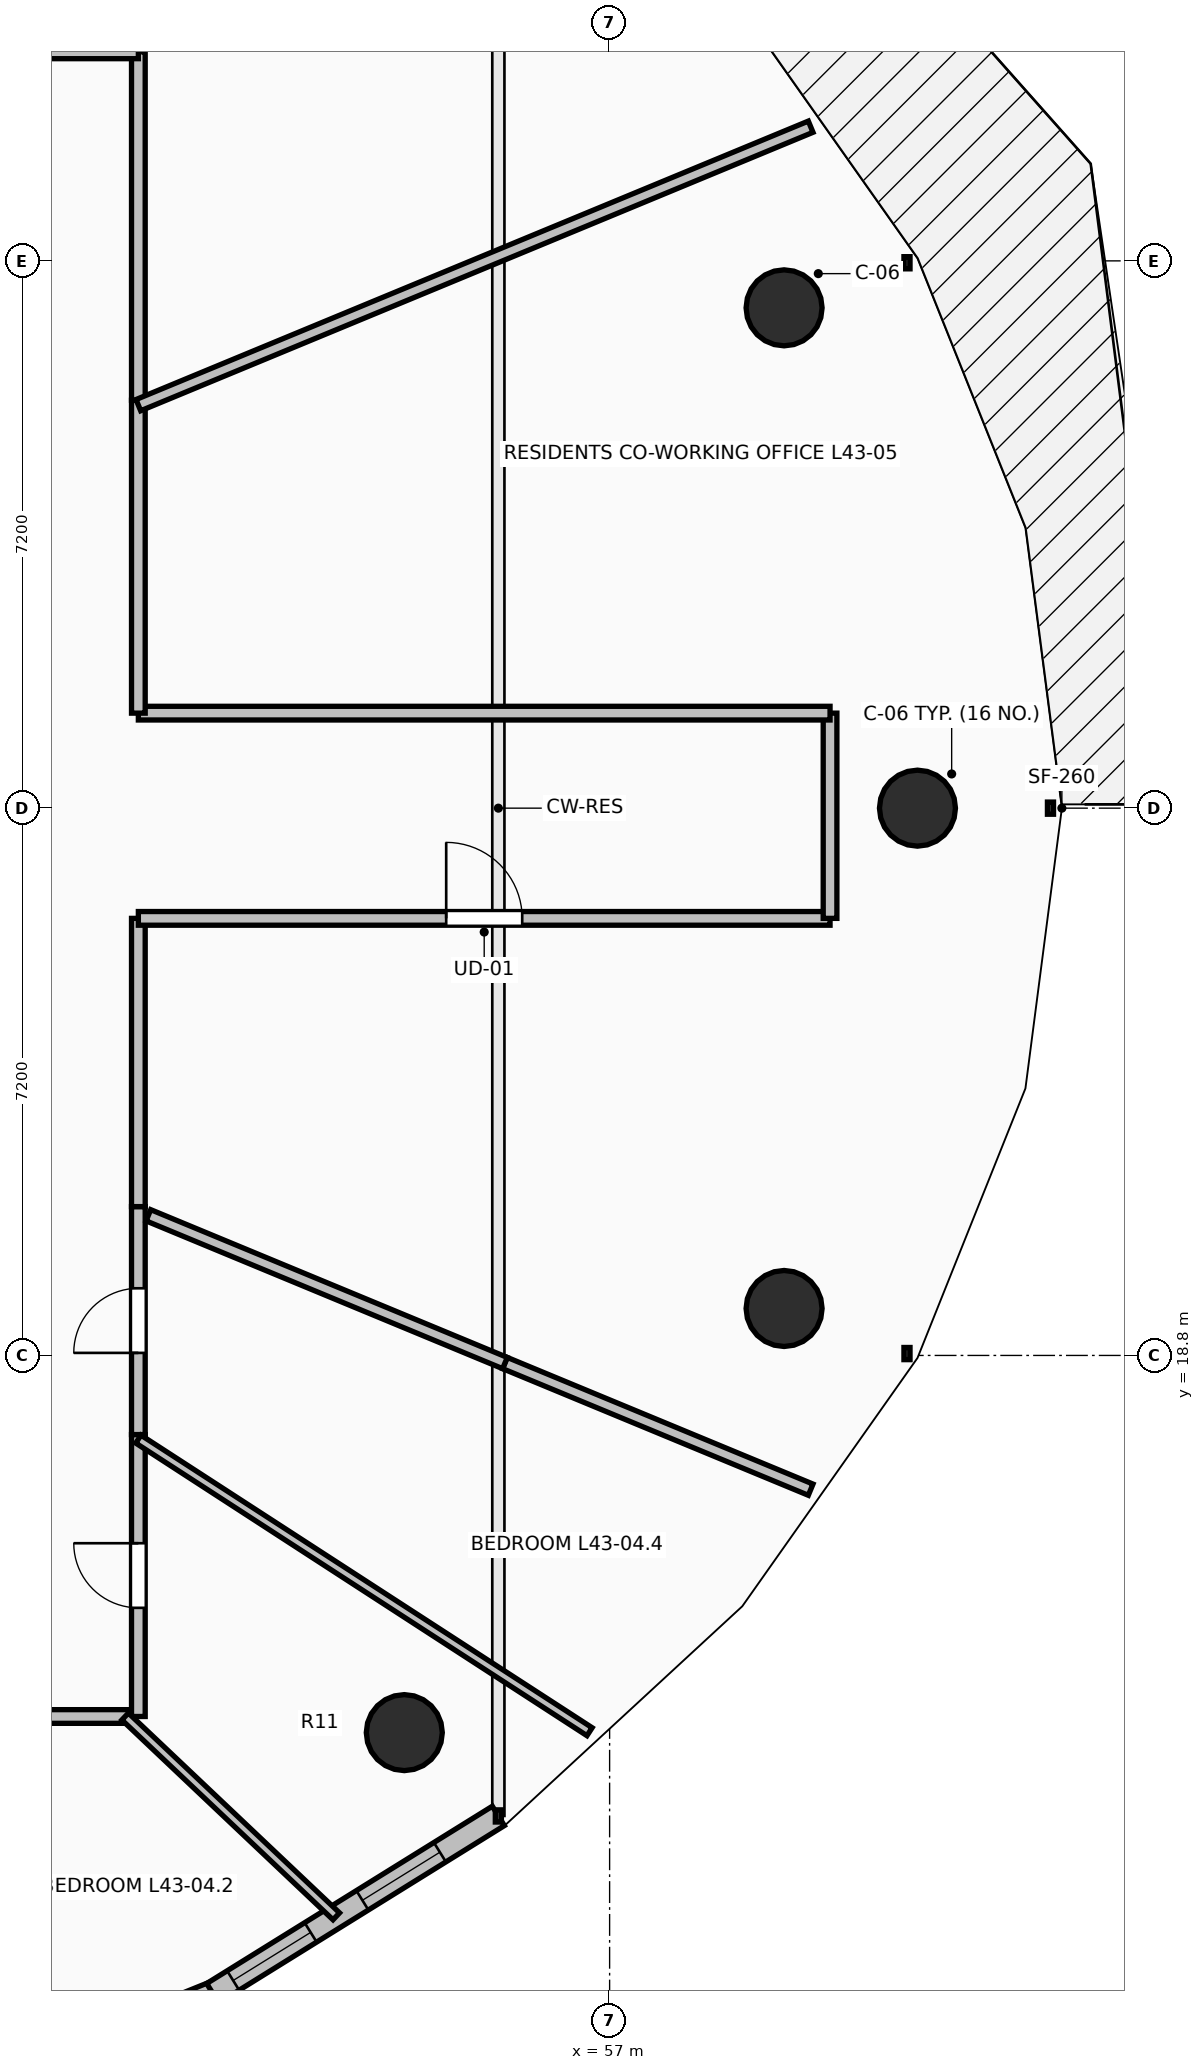
"""IFC4 building model, lengths in metres.
Left out: names, types, materials, properties, quantities, classifications, styles, units other than length and angle.
Written with IfcOpenShell. Run it as: python <this file> out.ifc"""

import sys

from ifc_helpers import new_model, si_unit, direction, frame, frame_2d, origin, origin_2d, place, context, subcontext, project, spatial, rectangle, circle, extrude, element, fill, save


model = new_model("IFC4")
c1 = context("Model", 3, precision=1e-05, world=origin(), true_north=direction((0.0, 1.0)))
c2 = subcontext(c1, "Body", "Model", "MODEL_VIEW")
j1 = project(units=[si_unit("LENGTHUNIT", "METRE"), si_unit("PLANEANGLEUNIT", "RADIAN")], contexts=[c1])
p1 = place(None, origin())
s1 = spatial("IfcSite", under=j1, at=p1, CompositionType="ELEMENT")
p2 = place(p1, origin())
s2 = spatial("IfcBuilding", under=s1, at=p2, CompositionType="ELEMENT")
p3 = place(p2, frame((0.0, 0.0, 160.6)))
s3 = spatial("IfcBuildingStorey", under=s2, at=p3, CompositionType="ELEMENT", Elevation=160.6)
for number, where, z_axis, x_axis in (
    (1, (61.05, 26.0, 0.0), (0.0, 0.0, 1.0), (1.0, 0.0, 0.0)),
    (2, (59.295, 32.582, 0.0), (0.0, 0.0, 1.0), (0.924, 0.383, 0.0)),
    (3, (54.299, 13.838, 0.0), (0.0, 0.0, 1.0), (0.707, -0.707, 0.0)),
    (4, (59.295, 19.418, 0.0), (0.0, 0.0, 1.0), (0.924, -0.383, 0.0)),
):
    element("IfcColumn", number, at=place(p3, frame(where, z_axis=z_axis, x_axis=x_axis)), inside=s3, PredefinedType="COLUMN", context=c2, shape_type="SweptSolid", body=[
        extrude(circle(Radius=0.5, at=origin_2d()), origin(), (0.0, 0.0, 1.0), 3.5),
    ])
p4 = place(p3, frame((47.49, 8.677, 0.0), z_axis=(0.0, 0.0, 1.0), x_axis=(0.927156504392, 0.374674280359, 0.0)))
e5 = element("IfcWall", 5, at=p4, inside=s3, PredefinedType="STANDARD", context=c2, shape_type="SweptSolid", body=[
    extrude(rectangle(XDim=4.625, YDim=0.3, at=frame_2d((2.312, 0.0))), origin(), (0.0, 0.0, 1.0), 3.24),
])
p5 = place(p4, frame((1.03, 0.0, 0.85)))
e6 = element("IfcOpeningElement", 6, at=p5, cuts=e5, PredefinedType="OPENING", context=c2, shape_type="SweptSolid", body=[
    extrude(rectangle(XDim=1.2, YDim=1.95, at=frame_2d((0.6, 0.975))), frame((0.0, 0.165, 0.0), z_axis=(0.0, -1.0, 0.0), x_axis=(1.0, 0.0, 0.0)), (0.0, 0.0, 1.0), 0.33),
])
p6 = place(p3, frame((51.778, 10.41, 0.0), z_axis=(0.0, 0.0, 1.0), x_axis=(0.849721181976, 0.527232313977, 0.0)))
e7 = element("IfcWall", 7, at=p6, inside=s3, PredefinedType="STANDARD", context=c2, shape_type="SweptSolid", body=[
    extrude(rectangle(XDim=4.423, YDim=0.3, at=frame_2d((2.211, 0.0))), origin(), (0.0, 0.0, 1.0), 3.24),
])
p7 = place(p6, frame((0.317, 0.0, 0.85)))
e8 = element("IfcOpeningElement", 8, at=p7, cuts=e7, PredefinedType="OPENING", context=c2, shape_type="SweptSolid", body=[
    extrude(rectangle(XDim=1.2, YDim=1.95, at=frame_2d((0.6, 0.975))), frame((0.0, 0.165, 0.0), z_axis=(0.0, -1.0, 0.0), x_axis=(1.0, 0.0, 0.0)), (0.0, 0.0, 1.0), 0.33),
])
p8 = place(p6, frame((2.318, 0.0, 0.85)))
e9 = element("IfcOpeningElement", 9, at=p8, cuts=e7, PredefinedType="OPENING", context=c2, shape_type="SweptSolid", body=[
    extrude(rectangle(XDim=1.2, YDim=1.95, at=frame_2d((0.6, 0.975))), frame((0.0, 0.165, 0.0), z_axis=(0.0, -1.0, 0.0), x_axis=(1.0, 0.0, 0.0)), (0.0, 0.0, 1.0), 0.33),
])
p9 = place(p3, frame((46.792, 14.05, 0.0), z_axis=(0.0, 0.0, 1.0), x_axis=(1.0, 0.0, 0.0)))
e10 = element("IfcWall", 10, at=p9, inside=s3, PredefinedType="PARTITIONING", context=c2, shape_type="SweptSolid", body=[
    extrude(rectangle(XDim=3.921, YDim=0.18, at=frame_2d((1.96, 0.0))), origin(), (0.0, 0.0, 1.0), 2.432),
])
p10 = place(p9, frame((1.535, 0.0, 0.0)))
e11 = element("IfcOpeningElement", 11, at=p10, cuts=e10, PredefinedType="OPENING", context=c2, shape_type="SweptSolid", body=[
    extrude(rectangle(XDim=0.85, YDim=2.1, at=frame_2d((0.425, 1.05))), frame((0.0, 0.105, 0.0), z_axis=(0.0, -1.0, 0.0), x_axis=(1.0, 0.0, 0.0)), (0.0, 0.0, 1.0), 0.21),
])
p11 = place(p3, frame((50.8, 14.05, 0.0), z_axis=(0.0, 0.0, 1.0), x_axis=(0.0, 1.0, 0.0)))
e12 = element("IfcWall", 12, at=p11, inside=s3, PredefinedType="PARTITIONING", context=c2, shape_type="SweptSolid", body=[
    extrude(rectangle(XDim=3.709, YDim=0.18, at=frame_2d((1.854, 0.0))), origin(), (0.0, 0.0, 1.0), 2.432),
])
p12 = place(p11, frame((1.429, 0.0, 0.0)))
e13 = element("IfcOpeningElement", 13, at=p12, cuts=e12, PredefinedType="OPENING", context=c2, shape_type="SweptSolid", body=[
    extrude(rectangle(XDim=0.85, YDim=2.1, at=frame_2d((0.425, 1.05))), frame((0.0, 0.105, 0.0), z_axis=(0.0, -1.0, 0.0), x_axis=(1.0, 0.0, 0.0)), (0.0, 0.0, 1.0), 0.21),
])
p13 = place(p3, frame((50.8, 17.759, 0.0), z_axis=(0.0, 0.0, 1.0), x_axis=(0.0, 1.0, 0.0)))
e14 = element("IfcWall", 14, at=p13, inside=s3, PredefinedType="PARTITIONING", context=c2, shape_type="SweptSolid", body=[
    extrude(rectangle(XDim=2.999, YDim=0.18, at=frame_2d((1.5, 0.0))), origin(), (0.0, 0.0, 1.0), 3.24),
])
p14 = place(p13, frame((1.074, 0.0, 0.0)))
e15 = element("IfcOpeningElement", 15, at=p14, cuts=e14, PredefinedType="OPENING", context=c2, shape_type="SweptSolid", body=[
    extrude(rectangle(XDim=0.85, YDim=2.1, at=frame_2d((0.425, 1.05))), frame((0.0, 0.105, 0.0), z_axis=(0.0, -1.0, 0.0), x_axis=(1.0, 0.0, 0.0)), (0.0, 0.0, 1.0), 0.21),
])
p15 = place(p3, frame((50.8, 20.758, 0.0), z_axis=(0.0, 0.0, 1.0), x_axis=(0.0, 1.0, 0.0)))
e16 = element("IfcWall", 16, at=p15, inside=s3, PredefinedType="PARTITIONING", context=c2, shape_type="SweptSolid", body=[
    extrude(rectangle(XDim=3.792, YDim=0.18, at=frame_2d((1.896, 0.0))), origin(), (0.0, 0.0, 1.0), 3.24),
])
p16 = place(p3, frame((50.8, 24.55, 0.0), z_axis=(0.0, 0.0, 1.0), x_axis=(1.0, 0.0, 0.0)))
e17 = element("IfcWall", 17, at=p16, inside=s3, PredefinedType="PARTITIONING", context=c2, shape_type="SweptSolid", body=[
    extrude(rectangle(XDim=9.1, YDim=0.18, at=frame_2d((4.55, 0.0))), origin(), (0.0, 0.0, 1.0), 2.432),
])
p17 = place(p16, frame((4.05, 0.0, 0.0)))
e18 = element("IfcOpeningElement", 18, at=p17, cuts=e17, PredefinedType="OPENING", context=c2, shape_type="SweptSolid", body=[
    extrude(rectangle(XDim=1.0, YDim=2.15, at=frame_2d((0.5, 1.075))), frame((0.0, 0.105, 0.0), z_axis=(0.0, -1.0, 0.0), x_axis=(1.0, 0.0, 0.0)), (0.0, 0.0, 1.0), 0.21),
])
p18 = place(p3, frame((59.9, 24.55, 0.0), z_axis=(0.0, 0.0, 1.0), x_axis=(0.0, 1.0, 0.0)))
e19 = element("IfcWall", 19, at=p18, inside=s3, PredefinedType="PARTITIONING", context=c2, shape_type="SweptSolid", body=[
    extrude(rectangle(XDim=2.7, YDim=0.18, at=frame_2d((1.35, 0.0))), origin(), (0.0, 0.0, 1.0), 2.432),
])
p19 = place(p3, frame((59.9, 27.25, 0.0), z_axis=(0.0, 0.0, 1.0), x_axis=(-1.0, 0.0, 0.0)))
e20 = element("IfcWall", 20, at=p19, inside=s3, PredefinedType="PARTITIONING", context=c2, shape_type="SweptSolid", body=[
    extrude(rectangle(XDim=9.1, YDim=0.18, at=frame_2d((4.55, 0.0))), origin(), (0.0, 0.0, 1.0), 2.432),
])
p20 = place(p3, frame((50.8, 27.25, 0.0), z_axis=(0.0, 0.0, 1.0), x_axis=(0.0, 1.0, 0.0)))
e21 = element("IfcWall", 21, at=p20, inside=s3, PredefinedType="PARTITIONING", context=c2, shape_type="SweptSolid", body=[
    extrude(rectangle(XDim=4.117, YDim=0.18, at=frame_2d((2.059, 0.0))), origin(), (0.0, 0.0, 1.0), 2.432),
])
p21 = place(p3, frame((50.8, 31.367, 0.0), z_axis=(0.0, 0.0, 1.0), x_axis=(0.0, 1.0, 0.0)))
e22 = element("IfcWall", 22, at=p21, inside=s3, PredefinedType="PARTITIONING", context=c2, shape_type="SweptSolid", body=[
    extrude(rectangle(XDim=4.583, YDim=0.18, at=frame_2d((2.292, 0.0))), origin(), (0.0, 0.0, 1.0), 2.432),
])
p22 = place(p3, frame((50.8, 35.95, 0.0), z_axis=(0.0, 0.0, 1.0), x_axis=(-1.0, 0.0, 0.0)))
e23 = element("IfcWall", 23, at=p22, inside=s3, PredefinedType="PARTITIONING", context=c2, shape_type="SweptSolid", body=[
    extrude(rectangle(XDim=8.474, YDim=0.18, at=frame_2d((4.237, 0.0))), origin(), (0.0, 0.0, 1.0), 2.432),
])
p23 = place(p22, frame((3.737, 0.0, 0.0)))
e24 = element("IfcOpeningElement", 24, at=p23, cuts=e23, PredefinedType="OPENING", context=c2, shape_type="SweptSolid", body=[
    extrude(rectangle(XDim=1.0, YDim=2.15, at=frame_2d((0.5, 1.075))), frame((0.0, 0.105, 0.0), z_axis=(0.0, -1.0, 0.0), x_axis=(1.0, 0.0, 0.0)), (0.0, 0.0, 1.0), 0.21),
])
p24 = place(p3, frame((49.92, 9.661, 0.0), z_axis=(0.0, 0.0, 1.0), x_axis=(-0.589349395673, 0.807878264233, 0.0)))
e25 = element("IfcWall", 25, at=p24, inside=s3, PredefinedType="PARTITIONING", context=c2, shape_type="SweptSolid", body=[
    extrude(rectangle(XDim=5.433, YDim=0.125, at=frame_2d((2.716, 0.0))), origin(), (0.0, 0.0, 1.0), 2.432),
])
p25 = place(p3, frame((53.404, 11.421, 0.0), z_axis=(0.0, 0.0, 1.0), x_axis=(-0.726306487509, 0.687370996044, 0.0)))
e26 = element("IfcWall", 26, at=p25, inside=s3, PredefinedType="PARTITIONING", context=c2, shape_type="SweptSolid", body=[
    extrude(rectangle(XDim=3.825, YDim=0.125, at=frame_2d((1.913, 0.0))), origin(), (0.0, 0.0, 1.0), 2.728),
])
p26 = place(p3, frame((56.736, 13.85, 0.0), z_axis=(0.0, 0.0, 1.0), x_axis=(-0.839059638195, 0.544039450364, 0.0)))
e27 = element("IfcWall", 27, at=p26, inside=s3, PredefinedType="PARTITIONING", context=c2, shape_type="SweptSolid", body=[
    extrude(rectangle(XDim=7.075, YDim=0.125, at=frame_2d((3.537, 0.0))), origin(), (0.0, 0.0, 1.0), 2.728),
])
p27 = place(p3, frame((59.645, 17.034, 0.0), z_axis=(0.0, 0.0, 1.0), x_axis=(-0.923874659351, 0.382695197002, 0.0)))
e28 = element("IfcWall", 28, at=p27, inside=s3, PredefinedType="PARTITIONING", context=c2, shape_type="SweptSolid", body=[
    extrude(rectangle(XDim=4.353, YDim=0.16, at=frame_2d((2.177, 0.0))), origin(), (0.0, 0.0, 1.0), 2.728),
])
p28 = place(p3, frame((55.623, 18.7, 0.0), z_axis=(0.0, 0.0, 1.0), x_axis=(-0.923813457571, 0.382842912446, 0.0)))
e29 = element("IfcWall", 29, at=p28, inside=s3, PredefinedType="PARTITIONING", context=c2, shape_type="SweptSolid", body=[
    extrude(rectangle(XDim=5.078, YDim=0.16, at=frame_2d((2.539, 0.0))), origin(), (0.0, 0.0, 1.0), 2.886),
])
p29 = place(p3, frame((59.645, 34.965, 0.0), z_axis=(0.0, 0.0, 1.0), x_axis=(-0.923902460479, -0.382628074665, 0.0)))
e30 = element("IfcWall", 30, at=p29, inside=s3, PredefinedType="PARTITIONING", context=c2, shape_type="SweptSolid", body=[
    extrude(rectangle(XDim=9.573, YDim=0.16, at=frame_2d((4.787, 0.0))), origin(), (0.0, 0.0, 1.0), 2.432),
])
p30 = place(p7, origin())
e31 = element("IfcWindow", 31, at=p30, inside=s3, PartitioningType="SINGLE_PANEL", PredefinedType="WINDOW", context=c2, shape_type="SweptSolid", body=[
    extrude(rectangle(XDim=1.2, YDim=1.95, at=frame_2d((0.6, 0.975))), frame((0.0, 0.03, 0.0), z_axis=(0.0, -1.0, 0.0), x_axis=(1.0, 0.0, 0.0)), (0.0, 0.0, 1.0), 0.06),
])
fill(e8, e31)
p31 = place(p8, origin())
e32 = element("IfcWindow", 32, at=p31, inside=s3, PartitioningType="SINGLE_PANEL", PredefinedType="WINDOW", context=c2, shape_type="SweptSolid", body=[
    extrude(rectangle(XDim=1.2, YDim=1.95, at=frame_2d((0.6, 0.975))), frame((0.0, 0.03, 0.0), z_axis=(0.0, -1.0, 0.0), x_axis=(1.0, 0.0, 0.0)), (0.0, 0.0, 1.0), 0.06),
])
fill(e9, e32)
p32 = place(p17, origin())
e33 = element("IfcDoor", 33, at=p32, inside=s3, OperationType="SINGLE_SWING_LEFT", PredefinedType="DOOR", context=c2, shape_type="SweptSolid", body=[
    extrude(rectangle(XDim=1.0, YDim=2.15, at=frame_2d((0.5, 1.075))), frame((0.0, 0.025, 0.0), z_axis=(0.0, -1.0, 0.0), x_axis=(1.0, 0.0, 0.0)), (0.0, 0.0, 1.0), 0.05),
])
fill(e18, e33)
p33 = place(p12, origin())
e34 = element("IfcDoor", 34, at=p33, inside=s3, OperationType="SINGLE_SWING_RIGHT", PredefinedType="DOOR", context=c2, shape_type="SweptSolid", body=[
    extrude(rectangle(XDim=0.85, YDim=2.1, at=frame_2d((0.425, 1.05))), frame((0.0, 0.025, 0.0), z_axis=(0.0, -1.0, 0.0), x_axis=(1.0, 0.0, 0.0)), (0.0, 0.0, 1.0), 0.05),
])
fill(e13, e34)
p34 = place(p14, origin())
e35 = element("IfcDoor", 35, at=p34, inside=s3, OperationType="SINGLE_SWING_LEFT", PredefinedType="DOOR", context=c2, shape_type="SweptSolid", body=[
    extrude(rectangle(XDim=0.85, YDim=2.1, at=frame_2d((0.425, 1.05))), frame((0.0, 0.025, 0.0), z_axis=(0.0, -1.0, 0.0), x_axis=(1.0, 0.0, 0.0)), (0.0, 0.0, 1.0), 0.05),
])
fill(e15, e35)
save(model, sys.argv[1])
